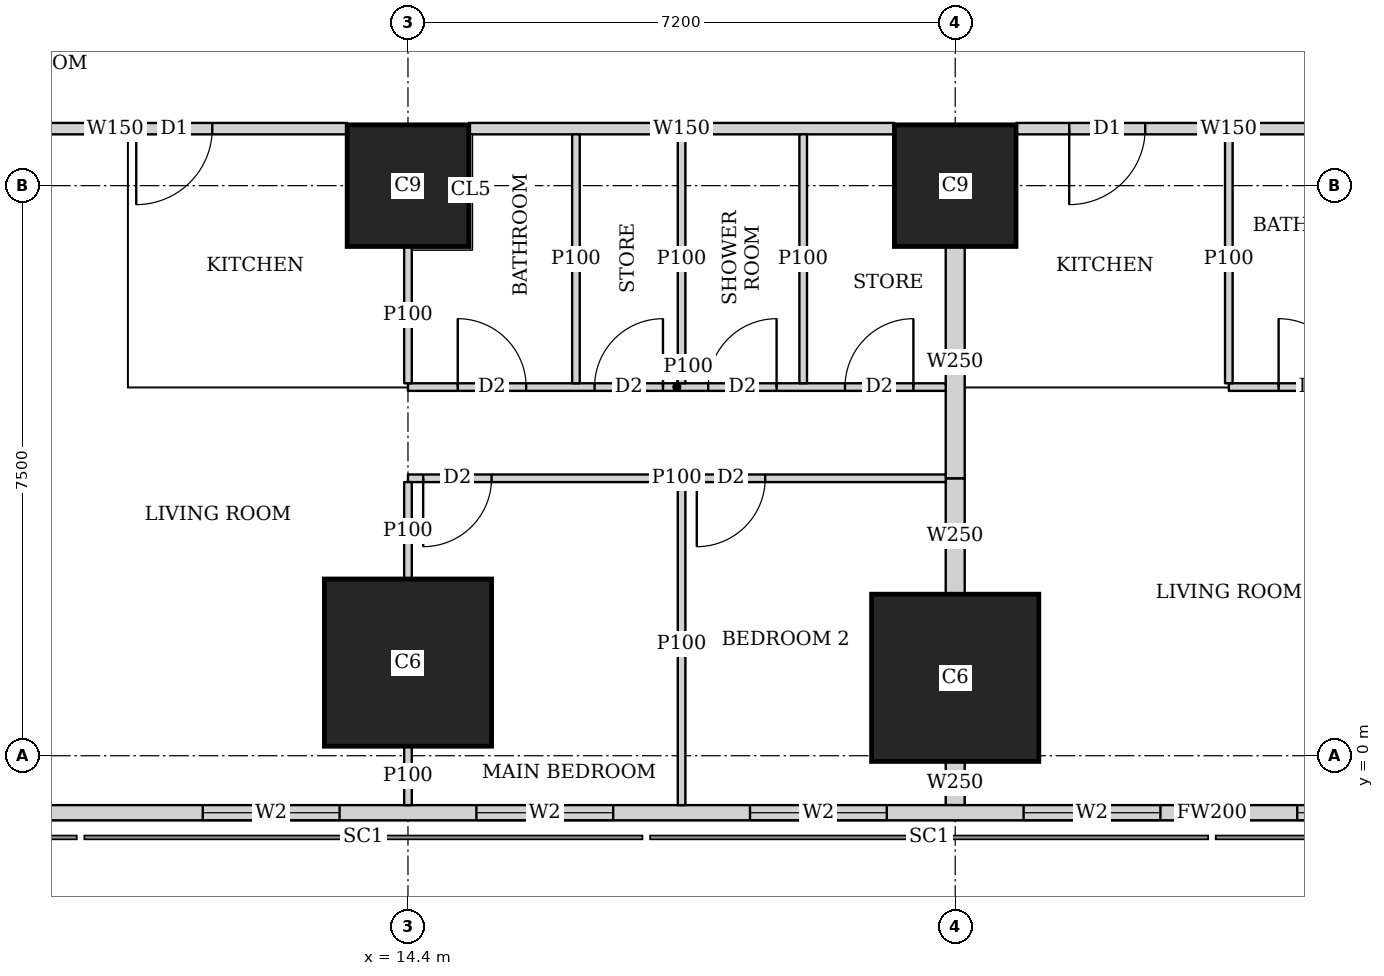
"""IFC4 building model, lengths in metres.
Left out: names, types, materials, properties, quantities, classifications, styles, units other than length and angle.
Written with IfcOpenShell. Run it as: python <this file> out.ifc"""

import sys

from ifc_helpers import new_model, si_unit, direction, frame, frame_2d, origin, origin_2d, place, context, subcontext, project, spatial, rectangle, extrude, element, fill, save


model = new_model("IFC4")
c1 = context("Model", 3, precision=1e-05, world=origin(), true_north=direction((0.0, 1.0)))
c2 = subcontext(c1, "Body", "Model", "MODEL_VIEW")
j1 = project(units=[si_unit("LENGTHUNIT", "METRE"), si_unit("PLANEANGLEUNIT", "RADIAN")], contexts=[c1])
p1 = place(None, origin())
s1 = spatial("IfcSite", under=j1, at=p1, CompositionType="ELEMENT")
p2 = place(p1, origin())
s2 = spatial("IfcBuilding", under=s1, at=p2, CompositionType="ELEMENT")
p3 = place(p2, frame((0.0, 0.0, 126.65)))
s3 = spatial("IfcBuildingStorey", under=s2, at=p3, CompositionType="ELEMENT", Elevation=126.65)
for number, where, z_axis, x_axis in (
    (1, (14.4, 1.225, 0.0), (0.0, 0.0, 1.0), (1.0, 0.0, 0.0)),
    (2, (21.6, 1.025, 0.0), (0.0, 0.0, 1.0), (1.0, 0.0, 0.0)),
):
    element("IfcColumn", number, at=place(p3, frame(where, z_axis=z_axis, x_axis=x_axis)), inside=s3, PredefinedType="COLUMN", context=c2, shape_type="SweptSolid", body=[
        extrude(rectangle(XDim=2.2, YDim=2.2, at=origin_2d()), origin(), (0.0, 0.0, 1.0), 3.75),
    ])
for number, where, z_axis, x_axis in (
    (3, (14.4, 7.5, 0.0), (0.0, 0.0, 1.0), (1.0, 0.0, 0.0)),
    (4, (21.6, 7.5, 0.0), (0.0, 0.0, 1.0), (1.0, 0.0, 0.0)),
):
    element("IfcColumn", number, at=place(p3, frame(where, z_axis=z_axis, x_axis=x_axis)), inside=s3, PredefinedType="COLUMN", context=c2, shape_type="SweptSolid", body=[
        extrude(rectangle(XDim=1.6, YDim=1.6, at=origin_2d()), origin(), (0.0, 0.0, 1.0), 3.75),
    ])
p4 = place(p3, frame((2.163, -0.75, 0.0), z_axis=(0.0, 0.0, 1.0), x_axis=(1.0, 0.0, 0.0)))
e5 = element("IfcWall", 5, at=p4, inside=s3, PredefinedType="SOLIDWALL", context=c2, shape_type="SweptSolid", body=[
    extrude(rectangle(XDim=45.628, YDim=0.2, at=frame_2d((22.814, 0.0))), origin(), (0.0, 0.0, 1.0), 3.45),
])
p5 = place(p4, frame((9.537, 0.0, 0.9)))
e6 = element("IfcOpeningElement", 6, at=p5, cuts=e5, PredefinedType="OPENING", context=c2, shape_type="SweptSolid", body=[
    extrude(rectangle(XDim=1.8, YDim=1.5, at=frame_2d((0.9, 0.75))), frame((0.0, 0.11, 0.0), z_axis=(0.0, -1.0, 0.0), x_axis=(1.0, 0.0, 0.0)), (0.0, 0.0, 1.0), 0.22),
])
p6 = place(p4, frame((13.137, 0.0, 0.9)))
e7 = element("IfcOpeningElement", 7, at=p6, cuts=e5, PredefinedType="OPENING", context=c2, shape_type="SweptSolid", body=[
    extrude(rectangle(XDim=1.8, YDim=1.5, at=frame_2d((0.9, 0.75))), frame((0.0, 0.11, 0.0), z_axis=(0.0, -1.0, 0.0), x_axis=(1.0, 0.0, 0.0)), (0.0, 0.0, 1.0), 0.22),
])
p7 = place(p4, frame((16.737, 0.0, 0.9)))
e8 = element("IfcOpeningElement", 8, at=p7, cuts=e5, PredefinedType="OPENING", context=c2, shape_type="SweptSolid", body=[
    extrude(rectangle(XDim=1.8, YDim=1.5, at=frame_2d((0.9, 0.75))), frame((0.0, 0.11, 0.0), z_axis=(0.0, -1.0, 0.0), x_axis=(1.0, 0.0, 0.0)), (0.0, 0.0, 1.0), 0.22),
])
p8 = place(p4, frame((20.337, 0.0, 0.9)))
e9 = element("IfcOpeningElement", 9, at=p8, cuts=e5, PredefinedType="OPENING", context=c2, shape_type="SweptSolid", body=[
    extrude(rectangle(XDim=1.8, YDim=1.5, at=frame_2d((0.9, 0.75))), frame((0.0, 0.11, 0.0), z_axis=(0.0, -1.0, 0.0), x_axis=(1.0, 0.0, 0.0)), (0.0, 0.0, 1.0), 0.22),
])
p9 = place(p4, frame((23.937, 0.0, 0.9)))
e10 = element("IfcOpeningElement", 10, at=p9, cuts=e5, PredefinedType="OPENING", context=c2, shape_type="SweptSolid", body=[
    extrude(rectangle(XDim=1.8, YDim=1.5, at=frame_2d((0.9, 0.75))), frame((0.0, 0.11, 0.0), z_axis=(0.0, -1.0, 0.0), x_axis=(1.0, 0.0, 0.0)), (0.0, 0.0, 1.0), 0.22),
])
p10 = place(p4, frame((27.537, 0.0, 0.9)))
e11 = element("IfcOpeningElement", 11, at=p10, cuts=e5, PredefinedType="OPENING", context=c2, shape_type="SweptSolid", body=[
    extrude(rectangle(XDim=1.8, YDim=1.5, at=frame_2d((0.9, 0.75))), frame((0.0, 0.11, 0.0), z_axis=(0.0, -1.0, 0.0), x_axis=(1.0, 0.0, 0.0)), (0.0, 0.0, 1.0), 0.22),
])
p11 = place(p4, frame((31.137, 0.0, 0.9)))
e12 = element("IfcOpeningElement", 12, at=p11, cuts=e5, PredefinedType="OPENING", context=c2, shape_type="SweptSolid", body=[
    extrude(rectangle(XDim=1.8, YDim=1.5, at=frame_2d((0.9, 0.75))), frame((0.0, 0.11, 0.0), z_axis=(0.0, -1.0, 0.0), x_axis=(1.0, 0.0, 0.0)), (0.0, 0.0, 1.0), 0.22),
])
p12 = place(p4, frame((34.737, 0.0, 0.9)))
e13 = element("IfcOpeningElement", 13, at=p12, cuts=e5, PredefinedType="OPENING", context=c2, shape_type="SweptSolid", body=[
    extrude(rectangle(XDim=1.8, YDim=1.5, at=frame_2d((0.9, 0.75))), frame((0.0, 0.11, 0.0), z_axis=(0.0, -1.0, 0.0), x_axis=(1.0, 0.0, 0.0)), (0.0, 0.0, 1.0), 0.22),
])
p13 = place(p3, frame((27.999, 8.25, 0.0), z_axis=(0.0, 0.0, 1.0), x_axis=(-1.0, 0.0, 0.0)))
e14 = element("IfcWall", 14, at=p13, inside=s3, PredefinedType="SOLIDWALL", context=c2, shape_type="SweptSolid", body=[
    extrude(rectangle(XDim=5.598, YDim=0.15, at=frame_2d((2.799, 0.0))), origin(), (0.0, 0.0, 1.0), 3.45),
])
p14 = place(p13, frame((3.899, 0.0, 0.0)))
e15 = element("IfcOpeningElement", 15, at=p14, cuts=e14, PredefinedType="OPENING", context=c2, shape_type="SweptSolid", body=[
    extrude(rectangle(XDim=1.0, YDim=2.1, at=frame_2d((0.5, 1.05))), frame((0.0, 0.085, 0.0), z_axis=(0.0, -1.0, 0.0), x_axis=(1.0, 0.0, 0.0)), (0.0, 0.0, 1.0), 0.17),
])
p15 = place(p3, frame((20.799, 8.25, 0.0), z_axis=(0.0, 0.0, 1.0), x_axis=(-1.0, 0.0, 0.0)))
e16 = element("IfcWall", 16, at=p15, inside=s3, PredefinedType="SOLIDWALL", context=c2, shape_type="SweptSolid", body=[
    extrude(rectangle(XDim=5.598, YDim=0.15, at=frame_2d((2.799, 0.0))), origin(), (0.0, 0.0, 1.0), 3.45),
])
p16 = place(p3, frame((13.599, 8.25, 0.0), z_axis=(0.0, 0.0, 1.0), x_axis=(-1.0, 0.0, 0.0)))
e17 = element("IfcWall", 17, at=p16, inside=s3, PredefinedType="SOLIDWALL", context=c2, shape_type="SweptSolid", body=[
    extrude(rectangle(XDim=5.499, YDim=0.15, at=frame_2d((2.75, 0.0))), origin(), (0.0, 0.0, 1.0), 3.45),
])
p17 = place(p16, frame((1.774, 0.0, 0.0)))
e18 = element("IfcOpeningElement", 18, at=p17, cuts=e17, PredefinedType="OPENING", context=c2, shape_type="SweptSolid", body=[
    extrude(rectangle(XDim=1.0, YDim=2.1, at=frame_2d((0.5, 1.05))), frame((0.0, 0.085, 0.0), z_axis=(0.0, -1.0, 0.0), x_axis=(1.0, 0.0, 0.0)), (0.0, 0.0, 1.0), 0.17),
])
p18 = place(p3, frame((21.475, 3.65, 0.0), z_axis=(0.0, 0.0, 1.0), x_axis=(-1.0, 0.0, 0.0)))
e19 = element("IfcWall", 19, at=p18, inside=s3, PredefinedType="PARTITIONING", context=c2, shape_type="SweptSolid", body=[
    extrude(rectangle(XDim=7.075, YDim=0.1, at=frame_2d((3.538, 0.0))), origin(), (0.0, 0.0, 1.0), 3.45),
])
p19 = place(p18, frame((5.975, 0.0, 0.0)))
e20 = element("IfcOpeningElement", 20, at=p19, cuts=e19, PredefinedType="OPENING", context=c2, shape_type="SweptSolid", body=[
    extrude(rectangle(XDim=0.9, YDim=2.1, at=frame_2d((0.45, 1.05))), frame((0.0, 0.06, 0.0), z_axis=(0.0, -1.0, 0.0), x_axis=(1.0, 0.0, 0.0)), (0.0, 0.0, 1.0), 0.12),
])
p20 = place(p18, frame((2.375, 0.0, 0.0)))
e21 = element("IfcOpeningElement", 21, at=p20, cuts=e19, PredefinedType="OPENING", context=c2, shape_type="SweptSolid", body=[
    extrude(rectangle(XDim=0.9, YDim=2.1, at=frame_2d((0.45, 1.05))), frame((0.0, 0.06, 0.0), z_axis=(0.0, -1.0, 0.0), x_axis=(1.0, 0.0, 0.0)), (0.0, 0.0, 1.0), 0.12),
])
p21 = place(p3, frame((21.475, 4.85, 0.0), z_axis=(0.0, 0.0, 1.0), x_axis=(-1.0, 0.0, 0.0)))
e22 = element("IfcWall", 22, at=p21, inside=s3, PredefinedType="PARTITIONING", context=c2, shape_type="SweptSolid", body=[
    extrude(rectangle(XDim=7.075, YDim=0.1, at=frame_2d((3.538, 0.0))), origin(), (0.0, 0.0, 1.0), 3.45),
])
p22 = place(p21, frame((5.52, 0.0, 0.0)))
e23 = element("IfcOpeningElement", 23, at=p22, cuts=e22, PredefinedType="OPENING", context=c2, shape_type="SweptSolid", body=[
    extrude(rectangle(XDim=0.9, YDim=2.1, at=frame_2d((0.45, 1.05))), frame((0.0, 0.06, 0.0), z_axis=(0.0, -1.0, 0.0), x_axis=(1.0, 0.0, 0.0)), (0.0, 0.0, 1.0), 0.12),
])
p23 = place(p21, frame((2.225, 0.0, 0.0)))
e24 = element("IfcOpeningElement", 24, at=p23, cuts=e22, PredefinedType="OPENING", context=c2, shape_type="SweptSolid", body=[
    extrude(rectangle(XDim=0.9, YDim=2.1, at=frame_2d((0.45, 1.05))), frame((0.0, 0.06, 0.0), z_axis=(0.0, -1.0, 0.0), x_axis=(1.0, 0.0, 0.0)), (0.0, 0.0, 1.0), 0.12),
])
p24 = place(p21, frame((3.72, 0.0, 0.0)))
e25 = element("IfcOpeningElement", 25, at=p24, cuts=e22, PredefinedType="OPENING", context=c2, shape_type="SweptSolid", body=[
    extrude(rectangle(XDim=0.9, YDim=2.1, at=frame_2d((0.45, 1.05))), frame((0.0, 0.06, 0.0), z_axis=(0.0, -1.0, 0.0), x_axis=(1.0, 0.0, 0.0)), (0.0, 0.0, 1.0), 0.12),
])
p25 = place(p21, frame((0.425, 0.0, 0.0)))
e26 = element("IfcOpeningElement", 26, at=p25, cuts=e22, PredefinedType="OPENING", context=c2, shape_type="SweptSolid", body=[
    extrude(rectangle(XDim=0.9, YDim=2.1, at=frame_2d((0.45, 1.05))), frame((0.0, 0.06, 0.0), z_axis=(0.0, -1.0, 0.0), x_axis=(1.0, 0.0, 0.0)), (0.0, 0.0, 1.0), 0.12),
])
p26 = place(p3, frame((14.4, -0.65, 0.0), z_axis=(0.0, 0.0, 1.0), x_axis=(0.0, 1.0, 0.0)))
e27 = element("IfcWall", 27, at=p26, inside=s3, PredefinedType="PARTITIONING", context=c2, shape_type="SweptSolid", body=[
    extrude(rectangle(XDim=0.774, YDim=0.1, at=frame_2d((0.387, 0.0))), origin(), (0.0, 0.0, 1.0), 3.45),
])
p27 = place(p3, frame((14.4, 2.326, 0.0), z_axis=(0.0, 0.0, 1.0), x_axis=(0.0, 1.0, 0.0)))
e28 = element("IfcWall", 28, at=p27, inside=s3, PredefinedType="PARTITIONING", context=c2, shape_type="SweptSolid", body=[
    extrude(rectangle(XDim=1.274, YDim=0.1, at=frame_2d((0.637, 0.0))), origin(), (0.0, 0.0, 1.0), 3.45),
])
p28 = place(p3, frame((18.0, -0.65, 0.0), z_axis=(0.0, 0.0, 1.0), x_axis=(0.0, 1.0, 0.0)))
e29 = element("IfcWall", 29, at=p28, inside=s3, PredefinedType="PARTITIONING", context=c2, shape_type="SweptSolid", body=[
    extrude(rectangle(XDim=4.25, YDim=0.1, at=frame_2d((2.125, 0.0))), origin(), (0.0, 0.0, 1.0), 2.15),
])
p29 = place(p3, frame((14.4, 4.9, 0.0), z_axis=(0.0, 0.0, 1.0), x_axis=(0.0, 1.0, 0.0)))
e30 = element("IfcWall", 30, at=p29, inside=s3, PredefinedType="PARTITIONING", context=c2, shape_type="SweptSolid", body=[
    extrude(rectangle(XDim=1.799, YDim=0.1, at=frame_2d((0.899, 0.0))), origin(), (0.0, 0.0, 1.0), 3.45),
])
for number, where, z_axis, x_axis in (
    (31, (18.0, 4.9, 0.0), (0.0, 0.0, 1.0), (0.0, 1.0, 0.0)),
    (32, (16.61, 4.9, 0.0), (0.0, 0.0, 1.0), (0.0, 1.0, 0.0)),
    (33, (19.6, 4.9, 0.0), (0.0, 0.0, 1.0), (0.0, 1.0, 0.0)),
):
    element("IfcWall", number, at=place(p3, frame(where, z_axis=z_axis, x_axis=x_axis)), inside=s3, PredefinedType="PARTITIONING", context=c2, shape_type="SweptSolid", body=[
        extrude(rectangle(XDim=3.275, YDim=0.1, at=frame_2d((1.638, 0.0))), origin(), (0.0, 0.0, 1.0), 3.45),
    ])
p30 = place(p3, frame((28.675, 4.85, 0.0), z_axis=(0.0, 0.0, 1.0), x_axis=(-1.0, 0.0, 0.0)))
e34 = element("IfcWall", 34, at=p30, inside=s3, PredefinedType="PARTITIONING", context=c2, shape_type="SweptSolid", body=[
    extrude(rectangle(XDim=3.475, YDim=0.1, at=frame_2d((1.738, 0.0))), origin(), (0.0, 0.0, 1.0), 3.45),
])
p31 = place(p30, frame((1.92, 0.0, 0.0)))
e35 = element("IfcOpeningElement", 35, at=p31, cuts=e34, PredefinedType="OPENING", context=c2, shape_type="SweptSolid", body=[
    extrude(rectangle(XDim=0.9, YDim=2.1, at=frame_2d((0.45, 1.05))), frame((0.0, 0.06, 0.0), z_axis=(0.0, -1.0, 0.0), x_axis=(1.0, 0.0, 0.0)), (0.0, 0.0, 1.0), 0.12),
])
p32 = place(p30, frame((0.15, 0.0, 0.0)))
e36 = element("IfcOpeningElement", 36, at=p32, cuts=e34, PredefinedType="OPENING", context=c2, shape_type="SweptSolid", body=[
    extrude(rectangle(XDim=0.9, YDim=2.1, at=frame_2d((0.45, 1.05))), frame((0.0, 0.06, 0.0), z_axis=(0.0, -1.0, 0.0), x_axis=(1.0, 0.0, 0.0)), (0.0, 0.0, 1.0), 0.12),
])
p33 = place(p3, frame((25.2, 4.9, 0.0), z_axis=(0.0, 0.0, 1.0), x_axis=(0.0, 1.0, 0.0)))
e37 = element("IfcWall", 37, at=p33, inside=s3, PredefinedType="PARTITIONING", context=c2, shape_type="SweptSolid", body=[
    extrude(rectangle(XDim=3.275, YDim=0.1, at=frame_2d((1.638, 0.0))), origin(), (0.0, 0.0, 1.0), 3.45),
])
p34 = place(p3, frame((21.6, -0.65, 0.0), z_axis=(0.0, 0.0, 1.0), x_axis=(0.0, 1.0, 0.0)))
e38 = element("IfcWall", 38, at=p34, inside=s3, PredefinedType="SOLIDWALL", context=c2, shape_type="SweptSolid", body=[
    extrude(rectangle(XDim=0.574, YDim=0.25, at=frame_2d((0.287, 0.0))), origin(), (0.0, 0.0, 1.0), 3.45),
])
p35 = place(p3, frame((21.6, 2.126, 0.0), z_axis=(0.0, 0.0, 1.0), x_axis=(0.0, 1.0, 0.0)))
e39 = element("IfcWall", 39, at=p35, inside=s3, PredefinedType="SOLIDWALL", context=c2, shape_type="SweptSolid", body=[
    extrude(rectangle(XDim=1.524, YDim=0.25, at=frame_2d((0.762, 0.0))), origin(), (0.0, 0.0, 1.0), 3.45),
])
p36 = place(p3, frame((21.6, 3.65, 0.0), z_axis=(0.0, 0.0, 1.0), x_axis=(0.0, 1.0, 0.0)))
e40 = element("IfcWall", 40, at=p36, inside=s3, PredefinedType="SOLIDWALL", context=c2, shape_type="SweptSolid", body=[
    extrude(rectangle(XDim=3.049, YDim=0.25, at=frame_2d((1.524, 0.0))), origin(), (0.0, 0.0, 1.0), 3.45),
])
p37 = place(p5, origin())
e41 = element("IfcWindow", 41, at=p37, inside=s3, PartitioningType="SINGLE_PANEL", PredefinedType="WINDOW", context=c2, shape_type="SweptSolid", body=[
    extrude(rectangle(XDim=1.8, YDim=1.5, at=frame_2d((0.9, 0.75))), frame((0.0, 0.03, 0.0), z_axis=(0.0, -1.0, 0.0), x_axis=(1.0, 0.0, 0.0)), (0.0, 0.0, 1.0), 0.06),
])
fill(e6, e41)
p38 = place(p6, origin())
e42 = element("IfcWindow", 42, at=p38, inside=s3, PartitioningType="SINGLE_PANEL", PredefinedType="WINDOW", context=c2, shape_type="SweptSolid", body=[
    extrude(rectangle(XDim=1.8, YDim=1.5, at=frame_2d((0.9, 0.75))), frame((0.0, 0.03, 0.0), z_axis=(0.0, -1.0, 0.0), x_axis=(1.0, 0.0, 0.0)), (0.0, 0.0, 1.0), 0.06),
])
fill(e7, e42)
p39 = place(p7, origin())
e43 = element("IfcWindow", 43, at=p39, inside=s3, PartitioningType="SINGLE_PANEL", PredefinedType="WINDOW", context=c2, shape_type="SweptSolid", body=[
    extrude(rectangle(XDim=1.8, YDim=1.5, at=frame_2d((0.9, 0.75))), frame((0.0, 0.03, 0.0), z_axis=(0.0, -1.0, 0.0), x_axis=(1.0, 0.0, 0.0)), (0.0, 0.0, 1.0), 0.06),
])
fill(e8, e43)
p40 = place(p8, origin())
e44 = element("IfcWindow", 44, at=p40, inside=s3, PartitioningType="SINGLE_PANEL", PredefinedType="WINDOW", context=c2, shape_type="SweptSolid", body=[
    extrude(rectangle(XDim=1.8, YDim=1.5, at=frame_2d((0.9, 0.75))), frame((0.0, 0.03, 0.0), z_axis=(0.0, -1.0, 0.0), x_axis=(1.0, 0.0, 0.0)), (0.0, 0.0, 1.0), 0.06),
])
fill(e9, e44)
p41 = place(p9, origin())
e45 = element("IfcWindow", 45, at=p41, inside=s3, PartitioningType="SINGLE_PANEL", PredefinedType="WINDOW", context=c2, shape_type="SweptSolid", body=[
    extrude(rectangle(XDim=1.8, YDim=1.5, at=frame_2d((0.9, 0.75))), frame((0.0, 0.03, 0.0), z_axis=(0.0, -1.0, 0.0), x_axis=(1.0, 0.0, 0.0)), (0.0, 0.0, 1.0), 0.06),
])
fill(e10, e45)
p42 = place(p19, origin())
e46 = element("IfcDoor", 46, at=p42, inside=s3, OperationType="SINGLE_SWING_RIGHT", PredefinedType="DOOR", context=c2, shape_type="SweptSolid", body=[
    extrude(rectangle(XDim=0.9, YDim=2.1, at=frame_2d((0.45, 1.05))), frame((0.0, 0.025, 0.0), z_axis=(0.0, -1.0, 0.0), x_axis=(1.0, 0.0, 0.0)), (0.0, 0.0, 1.0), 0.05),
])
fill(e20, e46)
p43 = place(p20, origin())
e47 = element("IfcDoor", 47, at=p43, inside=s3, OperationType="SINGLE_SWING_RIGHT", PredefinedType="DOOR", context=c2, shape_type="SweptSolid", body=[
    extrude(rectangle(XDim=0.9, YDim=2.1, at=frame_2d((0.45, 1.05))), frame((0.0, 0.025, 0.0), z_axis=(0.0, -1.0, 0.0), x_axis=(1.0, 0.0, 0.0)), (0.0, 0.0, 1.0), 0.05),
])
fill(e21, e47)
p44 = place(p22, origin())
e48 = element("IfcDoor", 48, at=p44, inside=s3, OperationType="SINGLE_SWING_LEFT", PredefinedType="DOOR", context=c2, shape_type="SweptSolid", body=[
    extrude(rectangle(XDim=0.9, YDim=2.1, at=frame_2d((0.45, 1.05))), frame((0.0, 0.025, 0.0), z_axis=(0.0, -1.0, 0.0), x_axis=(1.0, 0.0, 0.0)), (0.0, 0.0, 1.0), 0.05),
])
fill(e23, e48)
p45 = place(p23, origin())
e49 = element("IfcDoor", 49, at=p45, inside=s3, OperationType="SINGLE_SWING_RIGHT", PredefinedType="DOOR", context=c2, shape_type="SweptSolid", body=[
    extrude(rectangle(XDim=0.9, YDim=2.1, at=frame_2d((0.45, 1.05))), frame((0.0, 0.025, 0.0), z_axis=(0.0, -1.0, 0.0), x_axis=(1.0, 0.0, 0.0)), (0.0, 0.0, 1.0), 0.05),
])
fill(e24, e49)
p46 = place(p24, origin())
e50 = element("IfcDoor", 50, at=p46, inside=s3, OperationType="SINGLE_SWING_RIGHT", PredefinedType="DOOR", context=c2, shape_type="SweptSolid", body=[
    extrude(rectangle(XDim=0.9, YDim=2.1, at=frame_2d((0.45, 1.05))), frame((0.0, 0.025, 0.0), z_axis=(0.0, -1.0, 0.0), x_axis=(1.0, 0.0, 0.0)), (0.0, 0.0, 1.0), 0.05),
])
fill(e25, e50)
p47 = place(p25, origin())
e51 = element("IfcDoor", 51, at=p47, inside=s3, OperationType="SINGLE_SWING_RIGHT", PredefinedType="DOOR", context=c2, shape_type="SweptSolid", body=[
    extrude(rectangle(XDim=0.9, YDim=2.1, at=frame_2d((0.45, 1.05))), frame((0.0, 0.025, 0.0), z_axis=(0.0, -1.0, 0.0), x_axis=(1.0, 0.0, 0.0)), (0.0, 0.0, 1.0), 0.05),
])
fill(e26, e51)
p48 = place(p17, origin())
e52 = element("IfcDoor", 52, at=p48, inside=s3, OperationType="SINGLE_SWING_RIGHT", PredefinedType="DOOR", context=c2, shape_type="SweptSolid", body=[
    extrude(rectangle(XDim=1.0, YDim=2.1, at=frame_2d((0.5, 1.05))), frame((0.0, 0.025, 0.0), z_axis=(0.0, -1.0, 0.0), x_axis=(1.0, 0.0, 0.0)), (0.0, 0.0, 1.0), 0.05),
])
fill(e18, e52)
p49 = place(p31, origin())
e53 = element("IfcDoor", 53, at=p49, inside=s3, OperationType="SINGLE_SWING_LEFT", PredefinedType="DOOR", context=c2, shape_type="SweptSolid", body=[
    extrude(rectangle(XDim=0.9, YDim=2.1, at=frame_2d((0.45, 1.05))), frame((0.0, 0.025, 0.0), z_axis=(0.0, -1.0, 0.0), x_axis=(1.0, 0.0, 0.0)), (0.0, 0.0, 1.0), 0.05),
])
fill(e35, e53)
p50 = place(p14, origin())
e54 = element("IfcDoor", 54, at=p50, inside=s3, OperationType="SINGLE_SWING_RIGHT", PredefinedType="DOOR", context=c2, shape_type="SweptSolid", body=[
    extrude(rectangle(XDim=1.0, YDim=2.1, at=frame_2d((0.5, 1.05))), frame((0.0, 0.025, 0.0), z_axis=(0.0, -1.0, 0.0), x_axis=(1.0, 0.0, 0.0)), (0.0, 0.0, 1.0), 0.05),
])
fill(e15, e54)
save(model, sys.argv[1])
